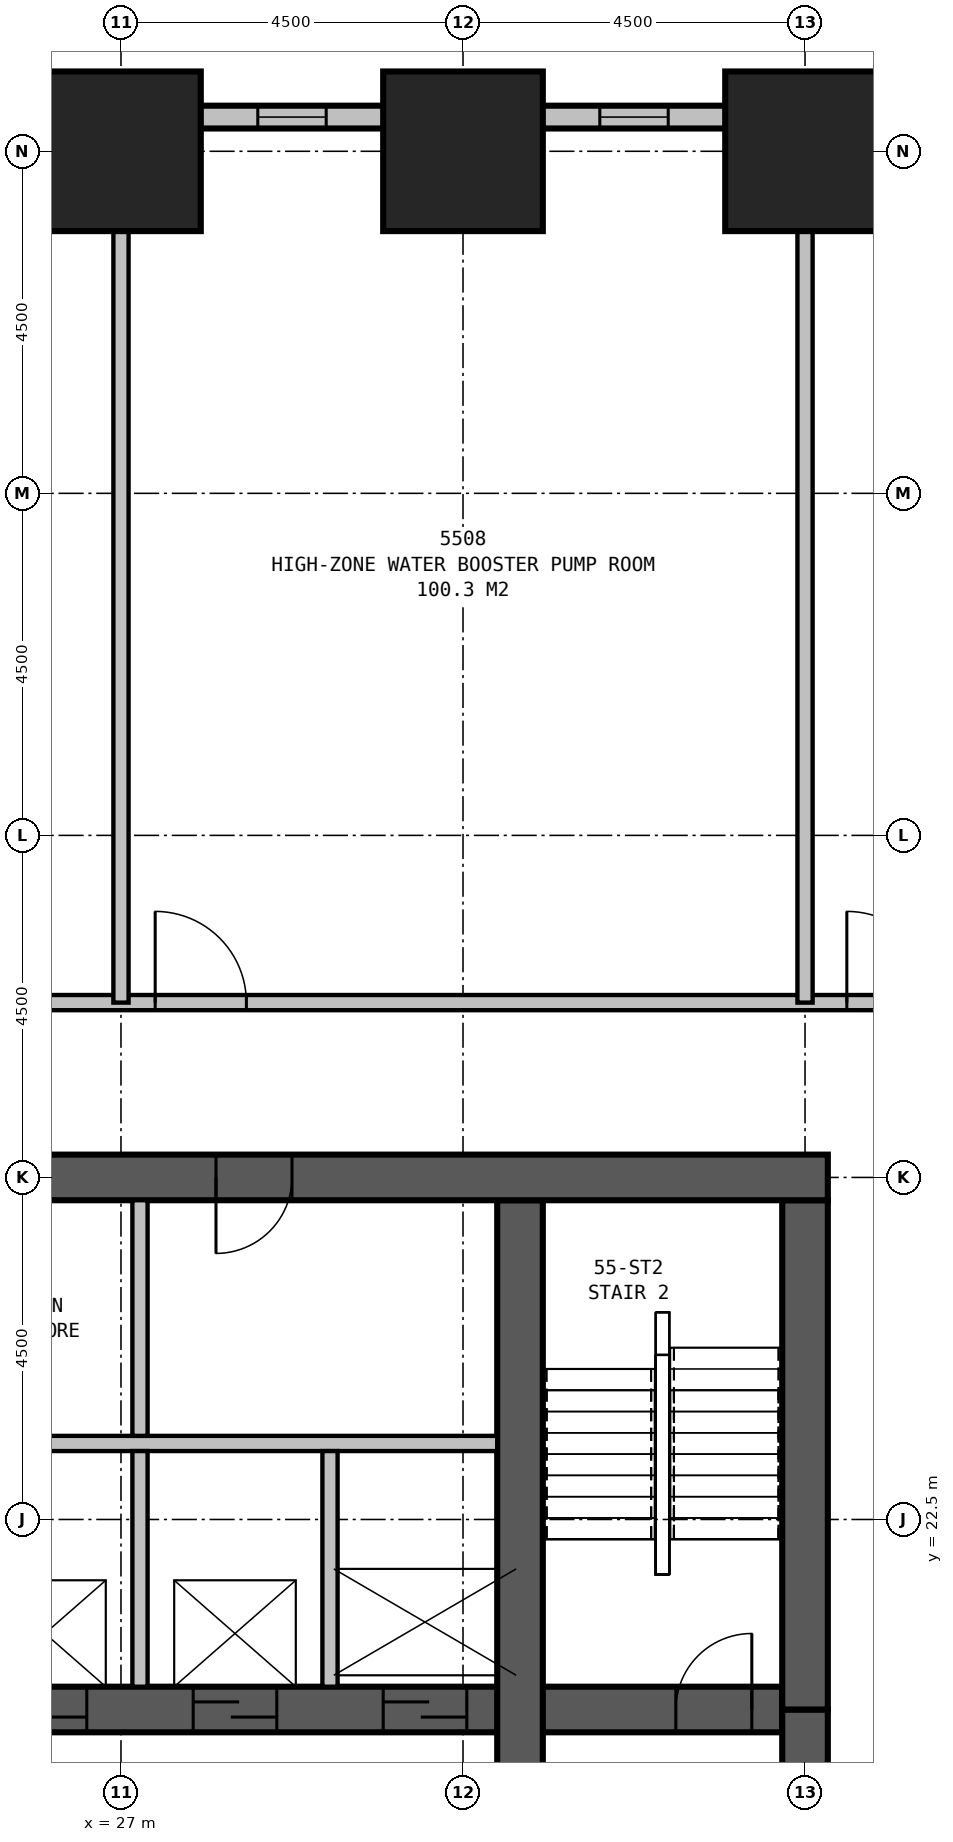
"""IFC4 building model, lengths in metres.
Left out: names, types, materials, properties, quantities, classifications, styles, units other than length and angle.
Written with IfcOpenShell. Run it as: python <this file> out.ifc"""

import sys

from ifc_helpers import new_model, si_unit, direction, frame, frame_2d, origin, origin_2d, place, context, subcontext, project, spatial, rectangle, extrude, element, fill, save


model = new_model("IFC4")
c1 = context("Model", 3, precision=1e-05, world=origin(), true_north=direction((0.0, 1.0)))
c2 = subcontext(c1, "Body", "Model", "MODEL_VIEW")
j1 = project(units=[si_unit("LENGTHUNIT", "METRE"), si_unit("PLANEANGLEUNIT", "RADIAN")], contexts=[c1])
p1 = place(None, origin())
s1 = spatial("IfcSite", under=j1, at=p1, CompositionType="ELEMENT")
p2 = place(p1, origin())
s2 = spatial("IfcBuilding", under=s1, at=p2, CompositionType="ELEMENT")
p3 = place(p2, frame((0.0, 0.0, 211.4)))
s3 = spatial("IfcBuildingStorey", under=s2, at=p3, CompositionType="ELEMENT", Elevation=211.4)
for number, where, z_axis, x_axis in (
    (1, (36.0, 40.5, 0.0), (0.0, 0.0, 1.0), (1.0, 0.0, 0.0)),
    (2, (31.5, 40.5, 0.0), (0.0, 0.0, 1.0), (1.0, 0.0, 0.0)),
    (3, (27.0, 40.5, 0.0), (0.0, 0.0, 1.0), (1.0, 0.0, 0.0)),
):
    element("IfcColumn", number, at=place(p3, frame(where, z_axis=z_axis, x_axis=x_axis)), inside=s3, PredefinedType="COLUMN", context=c2, shape_type="SweptSolid", body=[
        extrude(rectangle(XDim=2.1, YDim=2.1, at=origin_2d()), origin(), (0.0, 0.0, 1.0), 6.0),
    ])
p4 = place(p3, frame((36.3, 27.0, 0.0), z_axis=(0.0, 0.0, 1.0), x_axis=(-1.0, 0.0, 0.0)))
e4 = element("IfcWall", 4, at=p4, inside=s3, PredefinedType="SHEAR", context=c2, shape_type="SweptSolid", body=[
    extrude(rectangle(XDim=23.1, YDim=0.6, at=frame_2d((11.55, 0.0))), origin(), (0.0, 0.0, 1.0), 6.0),
])
p5 = place(p4, frame((17.05, 0.0, 0.0)))
e5 = element("IfcOpeningElement", 5, at=p5, cuts=e4, PredefinedType="OPENING", context=c2, shape_type="SweptSolid", body=[
    extrude(rectangle(XDim=1.0, YDim=2.1, at=frame_2d((0.5, 1.05))), frame((0.0, 0.31, 0.0), z_axis=(0.0, -1.0, 0.0), x_axis=(1.0, 0.0, 0.0)), (0.0, 0.0, 1.0), 0.62),
])
p6 = place(p4, frame((12.05, 0.0, 0.0)))
e6 = element("IfcOpeningElement", 6, at=p6, cuts=e4, PredefinedType="OPENING", context=c2, shape_type="SweptSolid", body=[
    extrude(rectangle(XDim=1.0, YDim=2.1, at=frame_2d((0.5, 1.05))), frame((0.0, 0.31, 0.0), z_axis=(0.0, -1.0, 0.0), x_axis=(1.0, 0.0, 0.0)), (0.0, 0.0, 1.0), 0.62),
])
p7 = place(p4, frame((7.05, 0.0, 0.0)))
e7 = element("IfcOpeningElement", 7, at=p7, cuts=e4, PredefinedType="OPENING", context=c2, shape_type="SweptSolid", body=[
    extrude(rectangle(XDim=1.0, YDim=2.1, at=frame_2d((0.5, 1.05))), frame((0.0, 0.31, 0.0), z_axis=(0.0, -1.0, 0.0), x_axis=(1.0, 0.0, 0.0)), (0.0, 0.0, 1.0), 0.62),
])
p8 = place(p3, frame((32.25, 13.8, 0.0), z_axis=(0.0, 0.0, 1.0), x_axis=(0.0, 1.0, 0.0)))
e8 = element("IfcWall", 8, at=p8, inside=s3, PredefinedType="SHEAR", context=c2, shape_type="SweptSolid", body=[
    extrude(rectangle(XDim=12.9, YDim=0.6, at=frame_2d((6.45, 0.0))), origin(), (0.0, 0.0, 1.0), 6.0),
])
p9 = place(p8, frame((5.05, 0.0, 0.0), z_axis=(0.0, 0.0, 1.0), x_axis=(-1.0, 0.0, 0.0)))
e9 = element("IfcOpeningElement", 9, at=p9, cuts=e8, PredefinedType="OPENING", context=c2, shape_type="SweptSolid", body=[
    extrude(rectangle(XDim=1.2, YDim=2.1, at=frame_2d((0.6, 1.05))), frame((0.0, 0.31, 0.0), z_axis=(0.0, -1.0, 0.0), x_axis=(1.0, 0.0, 0.0)), (0.0, 0.0, 1.0), 0.62),
])
p10 = place(p3, frame((13.8, 20.0, 0.0), z_axis=(0.0, 0.0, 1.0), x_axis=(1.0, 0.0, 0.0)))
e10 = element("IfcWall", 10, at=p10, inside=s3, PredefinedType="SHEAR", context=c2, shape_type="SweptSolid", body=[
    extrude(rectangle(XDim=21.9, YDim=0.6, at=frame_2d((10.95, 0.0))), origin(), (0.0, 0.0, 1.0), 6.0),
])
p11 = place(p10, frame((0.5, 0.0, 0.0)))
e11 = element("IfcOpeningElement", 11, at=p11, cuts=e10, PredefinedType="OPENING", context=c2, shape_type="SweptSolid", body=[
    extrude(rectangle(XDim=1.0, YDim=2.1, at=frame_2d((0.5, 1.05))), frame((0.0, 0.31, 0.0), z_axis=(0.0, -1.0, 0.0), x_axis=(1.0, 0.0, 0.0)), (0.0, 0.0, 1.0), 0.62),
])
p12 = place(p10, frame((20.5, 0.0, 0.0)))
e12 = element("IfcOpeningElement", 12, at=p12, cuts=e10, PredefinedType="OPENING", context=c2, shape_type="SweptSolid", body=[
    extrude(rectangle(XDim=1.0, YDim=2.1, at=frame_2d((0.5, 1.05))), frame((0.0, 0.31, 0.0), z_axis=(0.0, -1.0, 0.0), x_axis=(1.0, 0.0, 0.0)), (0.0, 0.0, 1.0), 0.62),
])
p13 = place(p10, frame((9.15, 0.0, 0.0)))
e13 = element("IfcOpeningElement", 13, at=p13, cuts=e10, PredefinedType="OPENING", context=c2, shape_type="SweptSolid", body=[
    extrude(rectangle(XDim=1.1, YDim=2.1, at=frame_2d((0.55, 1.05))), frame((0.0, 0.31, 0.0), z_axis=(0.0, -1.0, 0.0), x_axis=(1.0, 0.0, 0.0)), (0.0, 0.0, 1.0), 0.62),
])
p14 = place(p10, frame((11.65, 0.0, 0.0)))
e14 = element("IfcOpeningElement", 14, at=p14, cuts=e10, PredefinedType="OPENING", context=c2, shape_type="SweptSolid", body=[
    extrude(rectangle(XDim=1.1, YDim=2.1, at=frame_2d((0.55, 1.05))), frame((0.0, 0.31, 0.0), z_axis=(0.0, -1.0, 0.0), x_axis=(1.0, 0.0, 0.0)), (0.0, 0.0, 1.0), 0.62),
])
p15 = place(p10, frame((14.15, 0.0, 0.0)))
e15 = element("IfcOpeningElement", 15, at=p15, cuts=e10, PredefinedType="OPENING", context=c2, shape_type="SweptSolid", body=[
    extrude(rectangle(XDim=1.1, YDim=2.1, at=frame_2d((0.55, 1.05))), frame((0.0, 0.31, 0.0), z_axis=(0.0, -1.0, 0.0), x_axis=(1.0, 0.0, 0.0)), (0.0, 0.0, 1.0), 0.62),
])
p16 = place(p10, frame((16.65, 0.0, 0.0)))
e16 = element("IfcOpeningElement", 16, at=p16, cuts=e10, PredefinedType="OPENING", context=c2, shape_type="SweptSolid", body=[
    extrude(rectangle(XDim=1.1, YDim=2.1, at=frame_2d((0.55, 1.05))), frame((0.0, 0.31, 0.0), z_axis=(0.0, -1.0, 0.0), x_axis=(1.0, 0.0, 0.0)), (0.0, 0.0, 1.0), 0.62),
])
p17 = place(p10, frame((4.75, 0.0, 0.0)))
e17 = element("IfcOpeningElement", 17, at=p17, cuts=e10, PredefinedType="OPENING", context=c2, shape_type="SweptSolid", body=[
    extrude(rectangle(XDim=1.0, YDim=2.1, at=frame_2d((0.5, 1.05))), frame((0.0, 0.31, 0.0), z_axis=(0.0, -1.0, 0.0), x_axis=(1.0, 0.0, 0.0)), (0.0, 0.0, 1.0), 0.62),
])
p18 = place(p10, frame((6.7, 0.0, 0.0)))
e18 = element("IfcOpeningElement", 18, at=p18, cuts=e10, PredefinedType="OPENING", context=c2, shape_type="SweptSolid", body=[
    extrude(rectangle(XDim=1.0, YDim=2.1, at=frame_2d((0.5, 1.05))), frame((0.0, 0.31, 0.0), z_axis=(0.0, -1.0, 0.0), x_axis=(1.0, 0.0, 0.0)), (0.0, 0.0, 1.0), 0.62),
])
p19 = place(p3, frame((36.0, 16.5, 0.0), z_axis=(0.0, 0.0, 1.0), x_axis=(0.0, 1.0, 0.0)))
e19 = element("IfcWall", 19, at=p19, inside=s3, PredefinedType="SHEAR", context=c2, shape_type="SweptSolid", body=[
    extrude(rectangle(XDim=3.5, YDim=0.6, at=frame_2d((1.75, 0.0))), origin(), (0.0, 0.0, 1.0), 6.0),
])
p20 = place(p19, frame((0.65, 0.0, 0.0)))
e20 = element("IfcOpeningElement", 20, at=p20, cuts=e19, PredefinedType="OPENING", context=c2, shape_type="SweptSolid", body=[
    extrude(rectangle(XDim=1.2, YDim=2.1, at=frame_2d((0.6, 1.05))), frame((0.0, 0.31, 0.0), z_axis=(0.0, -1.0, 0.0), x_axis=(1.0, 0.0, 0.0)), (0.0, 0.0, 1.0), 0.62),
])
p21 = place(p3, frame((36.0, 20.0, 0.0), z_axis=(0.0, 0.0, 1.0), x_axis=(0.0, 1.0, 0.0)))
e21 = element("IfcWall", 21, at=p21, inside=s3, PredefinedType="SHEAR", context=c2, shape_type="SweptSolid", body=[
    extrude(rectangle(XDim=6.7, YDim=0.6, at=frame_2d((3.35, 0.0))), origin(), (0.0, 0.0, 1.0), 6.0),
])
p22 = place(p3, frame((41.1, 40.95, 0.0), z_axis=(0.0, 0.0, 1.0), x_axis=(-1.0, 0.0, 0.0)))
e22 = element("IfcWall", 22, at=p22, inside=s3, PredefinedType="STANDARD", context=c2, shape_type="SweptSolid", body=[
    extrude(rectangle(XDim=32.7, YDim=0.3, at=frame_2d((16.35, 0.0))), origin(), (0.0, 0.0, 1.0), 4.6),
])
p23 = place(p22, frame((2.4, 0.0, 0.5)))
e23 = element("IfcOpeningElement", 23, at=p23, cuts=e22, PredefinedType="OPENING", context=c2, shape_type="SweptSolid", body=[
    extrude(rectangle(XDim=0.9, YDim=1.2, at=frame_2d((0.45, 0.6))), frame((0.0, 0.16, 0.0), z_axis=(0.0, -1.0, 0.0), x_axis=(1.0, 0.0, 0.0)), (0.0, 0.0, 1.0), 0.32),
])
p24 = place(p22, frame((6.9, 0.0, 0.5)))
e24 = element("IfcOpeningElement", 24, at=p24, cuts=e22, PredefinedType="OPENING", context=c2, shape_type="SweptSolid", body=[
    extrude(rectangle(XDim=0.9, YDim=1.2, at=frame_2d((0.45, 0.6))), frame((0.0, 0.16, 0.0), z_axis=(0.0, -1.0, 0.0), x_axis=(1.0, 0.0, 0.0)), (0.0, 0.0, 1.0), 0.32),
])
p25 = place(p22, frame((11.4, 0.0, 0.5)))
e25 = element("IfcOpeningElement", 25, at=p25, cuts=e22, PredefinedType="OPENING", context=c2, shape_type="SweptSolid", body=[
    extrude(rectangle(XDim=0.9, YDim=1.2, at=frame_2d((0.45, 0.6))), frame((0.0, 0.16, 0.0), z_axis=(0.0, -1.0, 0.0), x_axis=(1.0, 0.0, 0.0)), (0.0, 0.0, 1.0), 0.32),
])
p26 = place(p22, frame((15.9, 0.0, 0.5)))
e26 = element("IfcOpeningElement", 26, at=p26, cuts=e22, PredefinedType="OPENING", context=c2, shape_type="SweptSolid", body=[
    extrude(rectangle(XDim=0.9, YDim=1.2, at=frame_2d((0.45, 0.6))), frame((0.0, 0.16, 0.0), z_axis=(0.0, -1.0, 0.0), x_axis=(1.0, 0.0, 0.0)), (0.0, 0.0, 1.0), 0.32),
])
p27 = place(p22, frame((20.4, 0.0, 0.5)))
e27 = element("IfcOpeningElement", 27, at=p27, cuts=e22, PredefinedType="OPENING", context=c2, shape_type="SweptSolid", body=[
    extrude(rectangle(XDim=0.9, YDim=1.2, at=frame_2d((0.45, 0.6))), frame((0.0, 0.16, 0.0), z_axis=(0.0, -1.0, 0.0), x_axis=(1.0, 0.0, 0.0)), (0.0, 0.0, 1.0), 0.32),
])
p28 = place(p22, frame((24.9, 0.0, 0.5)))
e28 = element("IfcOpeningElement", 28, at=p28, cuts=e22, PredefinedType="OPENING", context=c2, shape_type="SweptSolid", body=[
    extrude(rectangle(XDim=0.9, YDim=1.2, at=frame_2d((0.45, 0.6))), frame((0.0, 0.16, 0.0), z_axis=(0.0, -1.0, 0.0), x_axis=(1.0, 0.0, 0.0)), (0.0, 0.0, 1.0), 0.32),
])
p29 = place(p22, frame((29.4, 0.0, 0.5)))
e29 = element("IfcOpeningElement", 29, at=p29, cuts=e22, PredefinedType="OPENING", context=c2, shape_type="SweptSolid", body=[
    extrude(rectangle(XDim=0.9, YDim=1.2, at=frame_2d((0.45, 0.6))), frame((0.0, 0.16, 0.0), z_axis=(0.0, -1.0, 0.0), x_axis=(1.0, 0.0, 0.0)), (0.0, 0.0, 1.0), 0.32),
])
p30 = place(p3, frame((11.2, 29.3, 0.0), z_axis=(0.0, 0.0, 1.0), x_axis=(1.0, 0.0, 0.0)))
e30 = element("IfcWall", 30, at=p30, inside=s3, PredefinedType="PARTITIONING", context=c2, shape_type="SweptSolid", body=[
    extrude(rectangle(XDim=27.1, YDim=0.2, at=frame_2d((13.55, 0.0))), origin(), (0.0, 0.0, 1.0), 5.75),
])
p31 = place(p30, frame((3.15, 0.0, 0.0)))
e31 = element("IfcOpeningElement", 31, at=p31, cuts=e30, PredefinedType="OPENING", context=c2, shape_type="SweptSolid", body=[
    extrude(rectangle(XDim=1.2, YDim=2.1, at=frame_2d((0.6, 1.05))), frame((0.0, 0.11, 0.0), z_axis=(0.0, -1.0, 0.0), x_axis=(1.0, 0.0, 0.0)), (0.0, 0.0, 1.0), 0.22),
])
p32 = place(p30, frame((16.25, 0.0, 0.0)))
e32 = element("IfcOpeningElement", 32, at=p32, cuts=e30, PredefinedType="OPENING", context=c2, shape_type="SweptSolid", body=[
    extrude(rectangle(XDim=1.2, YDim=2.1, at=frame_2d((0.6, 1.05))), frame((0.0, 0.11, 0.0), z_axis=(0.0, -1.0, 0.0), x_axis=(1.0, 0.0, 0.0)), (0.0, 0.0, 1.0), 0.22),
])
p33 = place(p30, frame((0.25, 0.0, 0.0)))
e33 = element("IfcOpeningElement", 33, at=p33, cuts=e30, PredefinedType="OPENING", context=c2, shape_type="SweptSolid", body=[
    extrude(rectangle(XDim=1.2, YDim=2.1, at=frame_2d((0.6, 1.05))), frame((0.0, 0.11, 0.0), z_axis=(0.0, -1.0, 0.0), x_axis=(1.0, 0.0, 0.0)), (0.0, 0.0, 1.0), 0.22),
])
p34 = place(p30, frame((25.35, 0.0, 0.0)))
e34 = element("IfcOpeningElement", 34, at=p34, cuts=e30, PredefinedType="OPENING", context=c2, shape_type="SweptSolid", body=[
    extrude(rectangle(XDim=1.2, YDim=2.1, at=frame_2d((0.6, 1.05))), frame((0.0, 0.11, 0.0), z_axis=(0.0, -1.0, 0.0), x_axis=(1.0, 0.0, 0.0)), (0.0, 0.0, 1.0), 0.22),
])
for number, where, z_axis, x_axis in (
    (35, (27.0, 29.3, 0.0), (0.0, 0.0, 1.0), (0.0, 1.0, 0.0)),
    (36, (36.0, 29.3, 0.0), (0.0, 0.0, 1.0), (0.0, 1.0, 0.0)),
):
    element("IfcWall", number, at=place(p3, frame(where, z_axis=z_axis, x_axis=x_axis)), inside=s3, PredefinedType="PARTITIONING", context=c2, shape_type="SweptSolid", body=[
        extrude(rectangle(XDim=10.15, YDim=0.2, at=frame_2d((5.075, 0.0))), origin(), (0.0, 0.0, 1.0), 4.75),
    ])
for number, where, z_axis, x_axis in (
    (37, (27.25, 20.3, 0.0), (0.0, 0.0, 1.0), (0.0, 1.0, 0.0)),
    (38, (29.75, 20.3, 0.0), (0.0, 0.0, 1.0), (0.0, 1.0, 0.0)),
):
    element("IfcWall", number, at=place(p3, frame(where, z_axis=z_axis, x_axis=x_axis)), inside=s3, PredefinedType="PARTITIONING", context=c2, shape_type="SweptSolid", body=[
        extrude(rectangle(XDim=3.1, YDim=0.2, at=frame_2d((1.55, 0.0))), origin(), (0.0, 0.0, 1.0), 5.75),
    ])
p35 = place(p3, frame((17.55, 23.5, 0.0), z_axis=(0.0, 0.0, 1.0), x_axis=(1.0, 0.0, 0.0)))
e39 = element("IfcWall", 39, at=p35, inside=s3, PredefinedType="PARTITIONING", context=c2, shape_type="SweptSolid", body=[
    extrude(rectangle(XDim=14.4, YDim=0.2, at=frame_2d((7.2, 0.0))), origin(), (0.0, 0.0, 1.0), 5.75),
])
p36 = place(p3, frame((27.25, 23.6, 0.0), z_axis=(0.0, 0.0, 1.0), x_axis=(0.0, 1.0, 0.0)))
e40 = element("IfcWall", 40, at=p36, inside=s3, PredefinedType="PARTITIONING", context=c2, shape_type="SweptSolid", body=[
    extrude(rectangle(XDim=3.1, YDim=0.2, at=frame_2d((1.55, 0.0))), origin(), (0.0, 0.0, 1.0), 5.75),
])
p37 = place(p24, origin())
e41 = element("IfcWindow", 41, at=p37, inside=s3, PartitioningType="SINGLE_PANEL", PredefinedType="USERDEFINED", context=c2, shape_type="SweptSolid", body=[
    extrude(rectangle(XDim=0.9, YDim=1.2, at=frame_2d((0.45, 0.6))), frame((0.0, 0.03, 0.0), z_axis=(0.0, -1.0, 0.0), x_axis=(1.0, 0.0, 0.0)), (0.0, 0.0, 1.0), 0.06),
])
fill(e24, e41)
p38 = place(p25, origin())
e42 = element("IfcWindow", 42, at=p38, inside=s3, PartitioningType="SINGLE_PANEL", PredefinedType="USERDEFINED", context=c2, shape_type="SweptSolid", body=[
    extrude(rectangle(XDim=0.9, YDim=1.2, at=frame_2d((0.45, 0.6))), frame((0.0, 0.03, 0.0), z_axis=(0.0, -1.0, 0.0), x_axis=(1.0, 0.0, 0.0)), (0.0, 0.0, 1.0), 0.06),
])
fill(e25, e42)
p39 = place(p32, origin())
e43 = element("IfcDoor", 43, at=p39, inside=s3, OperationType="SINGLE_SWING_LEFT", PredefinedType="DOOR", context=c2, shape_type="SweptSolid", body=[
    extrude(rectangle(XDim=1.2, YDim=2.1, at=frame_2d((0.6, 1.05))), frame((0.0, 0.025, 0.0), z_axis=(0.0, -1.0, 0.0), x_axis=(1.0, 0.0, 0.0)), (0.0, 0.0, 1.0), 0.05),
])
fill(e32, e43)
p40 = place(p34, origin())
e44 = element("IfcDoor", 44, at=p40, inside=s3, OperationType="SINGLE_SWING_LEFT", PredefinedType="DOOR", context=c2, shape_type="SweptSolid", body=[
    extrude(rectangle(XDim=1.2, YDim=2.1, at=frame_2d((0.6, 1.05))), frame((0.0, 0.025, 0.0), z_axis=(0.0, -1.0, 0.0), x_axis=(1.0, 0.0, 0.0)), (0.0, 0.0, 1.0), 0.05),
])
fill(e34, e44)
p41 = place(p12, origin())
e45 = element("IfcDoor", 45, at=p41, inside=s3, OperationType="SINGLE_SWING_RIGHT", PredefinedType="DOOR", context=c2, shape_type="SweptSolid", body=[
    extrude(rectangle(XDim=1.0, YDim=2.1, at=frame_2d((0.5, 1.05))), frame((0.0, 0.3, 0.0), z_axis=(0.0, -1.0, 0.0), x_axis=(1.0, 0.0, 0.0)), (0.0, 0.0, 1.0), 0.6),
])
fill(e12, e45)
p42 = place(p14, origin())
e46 = element("IfcDoor", 46, at=p42, inside=s3, OperationType="SLIDING_TO_LEFT", PredefinedType="DOOR", context=c2, shape_type="SweptSolid", body=[
    extrude(rectangle(XDim=1.1, YDim=2.1, at=frame_2d((0.55, 1.05))), frame((0.0, 0.3, 0.0), z_axis=(0.0, -1.0, 0.0), x_axis=(1.0, 0.0, 0.0)), (0.0, 0.0, 1.0), 0.6),
])
fill(e14, e46)
p43 = place(p15, origin())
e47 = element("IfcDoor", 47, at=p43, inside=s3, OperationType="SLIDING_TO_LEFT", PredefinedType="DOOR", context=c2, shape_type="SweptSolid", body=[
    extrude(rectangle(XDim=1.1, YDim=2.1, at=frame_2d((0.55, 1.05))), frame((0.0, 0.3, 0.0), z_axis=(0.0, -1.0, 0.0), x_axis=(1.0, 0.0, 0.0)), (0.0, 0.0, 1.0), 0.6),
])
fill(e15, e47)
p44 = place(p16, origin())
e48 = element("IfcDoor", 48, at=p44, inside=s3, OperationType="SLIDING_TO_LEFT", PredefinedType="DOOR", context=c2, shape_type="SweptSolid", body=[
    extrude(rectangle(XDim=1.1, YDim=2.1, at=frame_2d((0.55, 1.05))), frame((0.0, 0.3, 0.0), z_axis=(0.0, -1.0, 0.0), x_axis=(1.0, 0.0, 0.0)), (0.0, 0.0, 1.0), 0.6),
])
fill(e16, e48)
p45 = place(p7, origin())
e49 = element("IfcDoor", 49, at=p45, inside=s3, OperationType="SINGLE_SWING_RIGHT", PredefinedType="DOOR", context=c2, shape_type="SweptSolid", body=[
    extrude(rectangle(XDim=1.0, YDim=2.1, at=frame_2d((0.5, 1.05))), frame((0.0, 0.3, 0.0), z_axis=(0.0, -1.0, 0.0), x_axis=(1.0, 0.0, 0.0)), (0.0, 0.0, 1.0), 0.6),
])
fill(e7, e49)
save(model, sys.argv[1])
